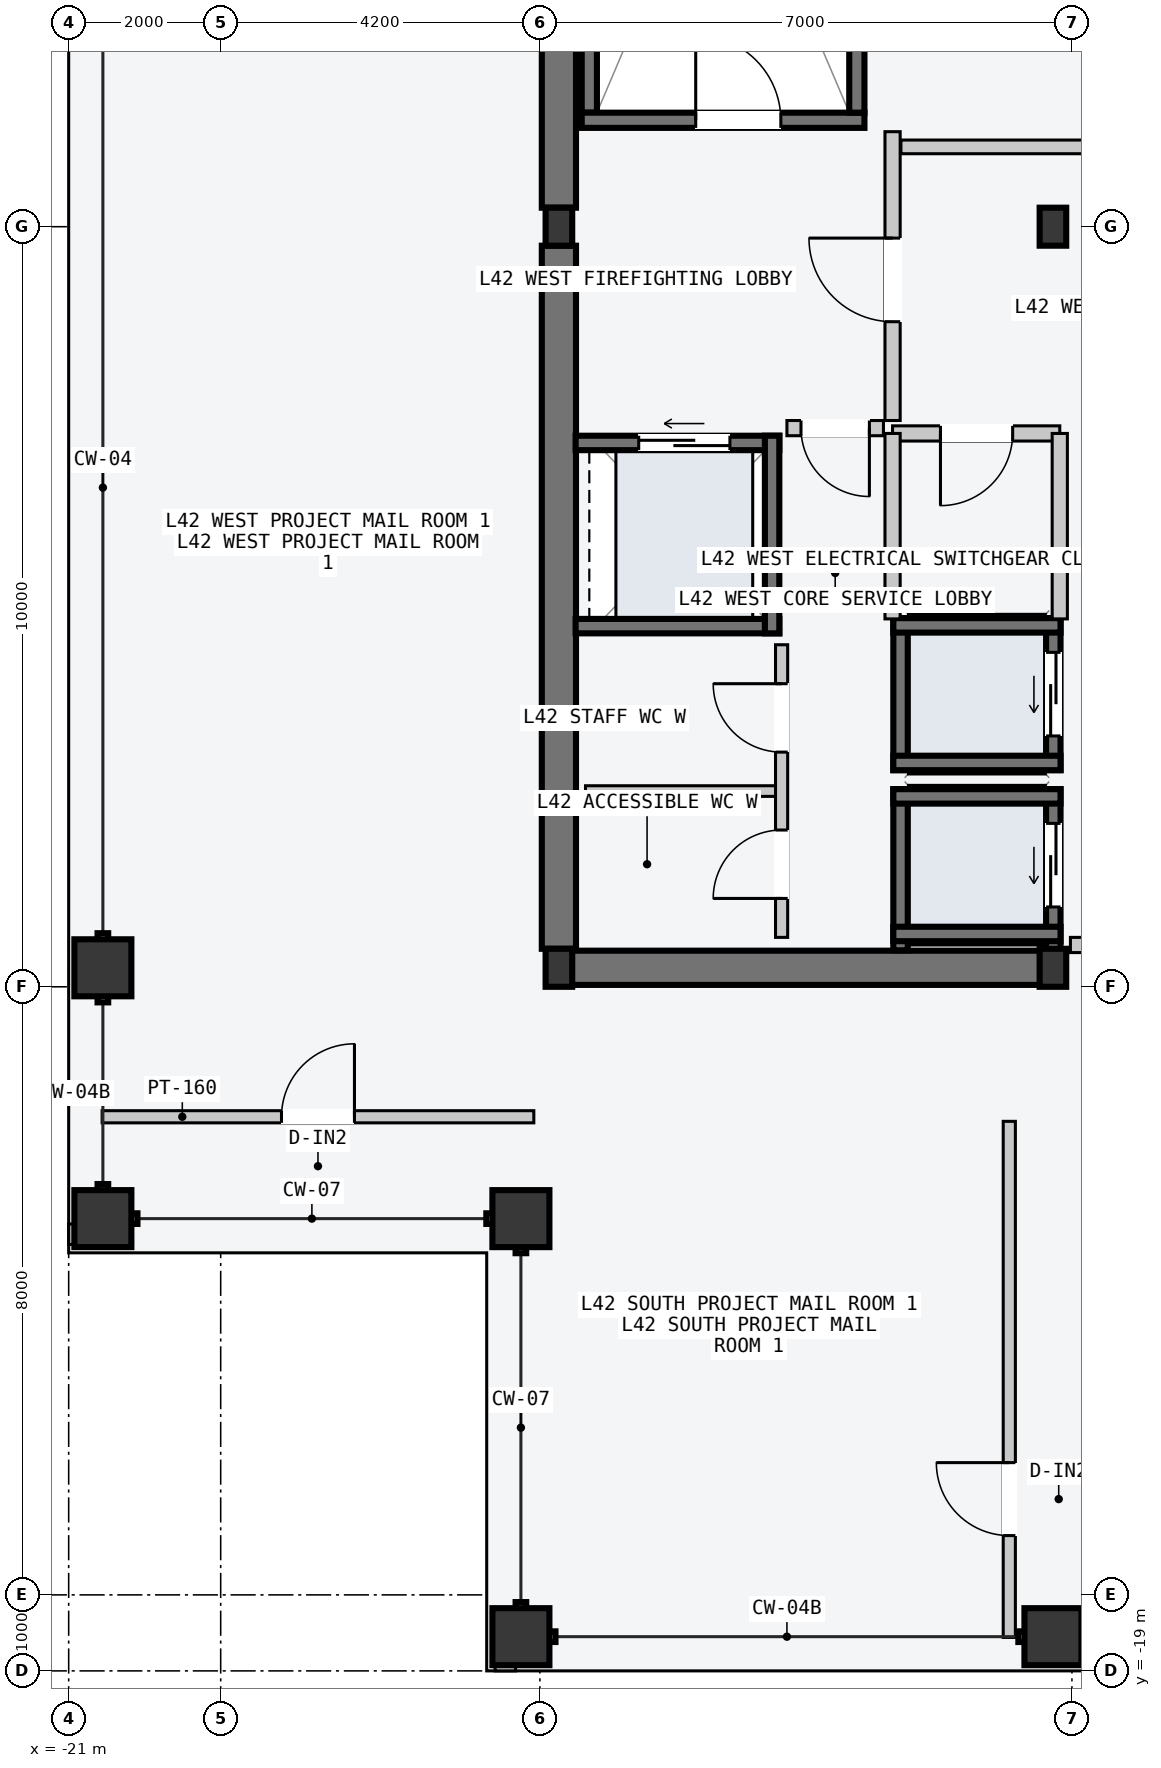
"""IFC4 building model, lengths in metres.
Left out: names, types, materials, properties, quantities, classifications, styles, units other than length and angle.
Written with IfcOpenShell. Run it as: python <this file> out.ifc"""

import sys

from ifc_helpers import new_model, si_unit, direction, frame, frame_2d, origin, origin_2d, place, context, subcontext, project, spatial, rectangle, hollow_rectangle, i_section, extrude, element, fill, save


model = new_model("IFC4")
c1 = context("Model", 3, precision=1e-05, world=origin(), true_north=direction((0.0, 1.0)))
c2 = subcontext(c1, "Body", "Model", "MODEL_VIEW")
j1 = project(units=[si_unit("LENGTHUNIT", "METRE"), si_unit("PLANEANGLEUNIT", "RADIAN")], contexts=[c1])
p1 = place(None, origin())
s1 = spatial("IfcSite", under=j1, at=p1, CompositionType="ELEMENT")
p2 = place(p1, origin())
s2 = spatial("IfcBuilding", under=s1, at=p2, CompositionType="ELEMENT")
p3 = place(p2, frame((0.0, 0.0, 162.3)))
s3 = spatial("IfcBuildingStorey", under=s2, at=p3, CompositionType="ELEMENT", Elevation=162.3)
p4 = place(p3, frame((-14.53, -9.75, -0.2), z_axis=(0.0, 0.0, 1.0), x_axis=(1.0, 0.0, 0.0)))
e1 = element("IfcWall", 1, at=p4, inside=s3, PredefinedType="SHEAR", context=c2, shape_type="SweptSolid", body=[
    extrude(rectangle(XDim=6.46, YDim=0.45, at=frame_2d((3.23, 0.0))), origin(), (0.0, 0.0, 1.0), 3.6),
])
for number, where, z_axis, x_axis in (
    (2, (-14.55, -9.5, -0.2), (0.0, 0.0, 1.0), (0.0, 1.0, 0.0)),
    (3, (-14.55, 0.25, -0.2), (0.0, 0.0, 1.0), (0.0, 1.0, 0.0)),
):
    element("IfcWall", number, at=place(p3, frame(where, z_axis=z_axis, x_axis=x_axis)), inside=s3, PredefinedType="SHEAR", context=c2, shape_type="SweptSolid", body=[
        extrude(rectangle(XDim=9.25, YDim=0.45, at=frame_2d((4.625, 0.0))), origin(), (0.0, 0.0, 1.0), 3.6),
    ])
p5 = place(p3, frame((-14.15, 1.5, -0.2), z_axis=(0.0, 0.0, 1.0), x_axis=(0.0, 1.0, 0.0)))
e4 = element("IfcWall", 4, at=p5, inside=s3, PredefinedType="SOLIDWALL", context=c2, shape_type="SweptSolid", body=[
    extrude(rectangle(XDim=7.8, YDim=0.2, at=frame_2d((3.9, 0.0))), origin(), (0.0, 0.0, 1.0), 3.6),
])
p6 = place(p3, frame((-14.25, 1.4, -0.2), z_axis=(0.0, 0.0, 1.0), x_axis=(1.0, 0.0, 0.0)))
e5 = element("IfcWall", 5, at=p6, inside=s3, PredefinedType="SOLIDWALL", context=c2, shape_type="SweptSolid", body=[
    extrude(rectangle(XDim=3.72, YDim=0.2, at=frame_2d((1.86, 0.0))), origin(), (0.0, 0.0, 1.0), 3.6),
])
p7 = place(p6, frame((1.5, 0.0, 0.2)))
e6 = element("IfcOpeningElement", 6, at=p7, cuts=e5, PredefinedType="OPENING", context=c2, shape_type="SweptSolid", body=[
    extrude(rectangle(XDim=1.12, YDim=2.18, at=frame_2d((0.56, 1.09))), frame((0.0, 0.11, 0.0), z_axis=(0.0, -1.0, 0.0), x_axis=(1.0, 0.0, 0.0)), (0.0, 0.0, 1.0), 0.22),
])
p8 = place(p3, frame((-10.63, 1.5, -0.2), z_axis=(0.0, 0.0, 1.0), x_axis=(0.0, 1.0, 0.0)))
e7 = element("IfcWall", 7, at=p8, inside=s3, PredefinedType="SOLIDWALL", context=c2, shape_type="SweptSolid", body=[
    extrude(rectangle(XDim=7.8, YDim=0.2, at=frame_2d((3.9, 0.0))), origin(), (0.0, 0.0, 1.0), 3.6),
])
for number, where, z_axis, x_axis in (
    (8, (-14.55, -9.75, 0.0), (0.0, 0.0, 1.0), (1.0, 0.0, 0.0)),
    (9, (-14.55, 0.0, 0.0), (0.0, 0.0, 1.0), (1.0, 0.0, 0.0)),
    (10, (-8.05, -9.75, 0.0), (0.0, 0.0, 1.0), (1.0, 0.0, 0.0)),
    (11, (-8.05, 0.0, 0.0), (0.0, 0.0, 1.0), (1.0, 0.0, 0.0)),
):
    element("IfcColumn", number, at=place(p3, frame(where, z_axis=z_axis, x_axis=x_axis)), inside=s3, PredefinedType="COLUMN", context=c2, shape_type="SweptSolid", body=[
        extrude(i_section(OverallWidth=0.35, OverallDepth=0.5, WebThickness=0.02, FlangeThickness=0.032, at=origin_2d()), origin(), (0.0, 0.0, 1.0), 3.6),
    ])
for number, where, z_axis, x_axis in (
    (12, (-15.05, -18.55, 0.0), (0.0, 0.0, 1.0), (1.0, 0.0, 0.0)),
    (13, (-8.05, -18.55, 0.0), (0.0, 0.0, 1.0), (1.0, 0.0, 0.0)),
    (14, (-20.55, -13.05, 0.0), (0.0, 0.0, 1.0), (0.0, 1.0, 0.0)),
    (15, (-20.55, -9.75, 0.0), (0.0, 0.0, 1.0), (0.0, 1.0, 0.0)),
    (16, (-15.05, -13.05, 0.0), (0.0, 0.0, 1.0), (1.0, 0.0, 0.0)),
):
    element("IfcColumn", number, at=place(p3, frame(where, z_axis=z_axis, x_axis=x_axis)), inside=s3, PredefinedType="COLUMN", context=c2, shape_type="SweptSolid", body=[
        extrude(hollow_rectangle(XDim=0.75, YDim=0.75, WallThickness=0.032, at=origin_2d()), origin(), (0.0, 0.0, 1.0), 3.6),
    ])
for number, where, z_axis, x_axis in (
    (17, (-15.39, -18.89, 0.0), (0.0, 0.0, 1.0), (1.0, 0.0, 0.0)),
    (18, (-20.89, -13.39, 0.0), (0.0, 0.0, 1.0), (0.0, 1.0, 0.0)),
):
    element("IfcWall", number, at=place(p3, frame(where, z_axis=z_axis, x_axis=x_axis)), inside=s3, PredefinedType="PARAPET", context=c2, shape_type="SweptSolid", body=[
        extrude(rectangle(XDim=0.27, YDim=0.22, at=frame_2d((0.135, 0.0))), origin(), (0.0, 0.0, 1.0), 1.2),
    ])
p9 = place(p3, frame((-8.045, -9.52, -0.2), z_axis=(0.0, 0.0, 1.0), x_axis=(0.0, 1.0, 0.0)))
e19 = element("IfcWall", 19, at=p9, inside=s3, PredefinedType="SOLIDWALL", context=c2, shape_type="SweptSolid", body=[
    extrude(rectangle(XDim=2.12, YDim=0.19, at=frame_2d((1.06, 0.0))), origin(), (0.0, 0.0, 1.0), 3.6),
])
p10 = place(p9, frame((0.57, 0.0, 0.2)))
e20 = element("IfcOpeningElement", 20, at=p10, cuts=e19, PredefinedType="OPENING", context=c2, shape_type="SweptSolid", body=[
    extrude(rectangle(XDim=1.1, YDim=2.2, at=frame_2d((0.55, 1.1))), frame((0.0, 0.105, 0.0), z_axis=(0.0, -1.0, 0.0), x_axis=(1.0, 0.0, 0.0)), (0.0, 0.0, 1.0), 0.21),
])
p11 = place(p3, frame((-10.055, -9.52, -0.2), z_axis=(0.0, 0.0, 1.0), x_axis=(0.0, 1.0, 0.0)))
e21 = element("IfcWall", 21, at=p11, inside=s3, PredefinedType="SOLIDWALL", context=c2, shape_type="SweptSolid", body=[
    extrude(rectangle(XDim=2.12, YDim=0.19, at=frame_2d((1.06, 0.0))), origin(), (0.0, 0.0, 1.0), 3.6),
])
for number, where, z_axis, x_axis in (
    (22, (-10.15, -7.495, -0.2), (0.0, 0.0, 1.0), (1.0, 0.0, 0.0)),
    (23, (-10.15, -9.305, -0.2), (0.0, 0.0, 1.0), (1.0, 0.0, 0.0)),
):
    element("IfcWall", number, at=place(p3, frame(where, z_axis=z_axis, x_axis=x_axis)), inside=s3, PredefinedType="SOLIDWALL", context=c2, shape_type="SweptSolid", body=[
        extrude(rectangle(XDim=2.2, YDim=0.19, at=frame_2d((1.1, 0.0))), origin(), (0.0, 0.0, 1.0), 3.6),
    ])
p12 = place(p3, frame((-8.045, -7.15, -0.2), z_axis=(0.0, 0.0, 1.0), x_axis=(0.0, 1.0, 0.0)))
e24 = element("IfcWall", 24, at=p12, inside=s3, PredefinedType="SOLIDWALL", context=c2, shape_type="SweptSolid", body=[
    extrude(rectangle(XDim=2.0, YDim=0.19, at=frame_2d((1.0, 0.0))), origin(), (0.0, 0.0, 1.0), 3.6),
])
p13 = place(p12, frame((0.45, 0.0, 0.2)))
e25 = element("IfcOpeningElement", 25, at=p13, cuts=e24, PredefinedType="OPENING", context=c2, shape_type="SweptSolid", body=[
    extrude(rectangle(XDim=1.1, YDim=2.2, at=frame_2d((0.55, 1.1))), frame((0.0, 0.105, 0.0), z_axis=(0.0, -1.0, 0.0), x_axis=(1.0, 0.0, 0.0)), (0.0, 0.0, 1.0), 0.21),
])
p14 = place(p3, frame((-10.055, -7.15, -0.2), z_axis=(0.0, 0.0, 1.0), x_axis=(0.0, 1.0, 0.0)))
e26 = element("IfcWall", 26, at=p14, inside=s3, PredefinedType="SOLIDWALL", context=c2, shape_type="SweptSolid", body=[
    extrude(rectangle(XDim=2.0, YDim=0.19, at=frame_2d((1.0, 0.0))), origin(), (0.0, 0.0, 1.0), 3.6),
])
for number, where, z_axis, x_axis in (
    (27, (-10.15, -5.245, -0.2), (0.0, 0.0, 1.0), (1.0, 0.0, 0.0)),
    (28, (-10.15, -7.055, -0.2), (0.0, 0.0, 1.0), (1.0, 0.0, 0.0)),
):
    element("IfcWall", number, at=place(p3, frame(where, z_axis=z_axis, x_axis=x_axis)), inside=s3, PredefinedType="SOLIDWALL", context=c2, shape_type="SweptSolid", body=[
        extrude(rectangle(XDim=2.2, YDim=0.19, at=frame_2d((1.1, 0.0))), origin(), (0.0, 0.0, 1.0), 3.6),
    ])
p15 = place(p3, frame((-14.33, -2.845, -0.2), z_axis=(0.0, 0.0, 1.0), x_axis=(1.0, 0.0, 0.0)))
e29 = element("IfcWall", 29, at=p15, inside=s3, PredefinedType="SOLIDWALL", context=c2, shape_type="SweptSolid", body=[
    extrude(rectangle(XDim=2.68, YDim=0.19, at=frame_2d((1.34, 0.0))), origin(), (0.0, 0.0, 1.0), 3.6),
])
p16 = place(p15, frame((0.83, 0.0, 0.2)))
e30 = element("IfcOpeningElement", 30, at=p16, cuts=e29, PredefinedType="OPENING", context=c2, shape_type="SweptSolid", body=[
    extrude(rectangle(XDim=1.2, YDim=2.2, at=frame_2d((0.6, 1.1))), frame((0.0, 0.105, 0.0), z_axis=(0.0, -1.0, 0.0), x_axis=(1.0, 0.0, 0.0)), (0.0, 0.0, 1.0), 0.21),
])
p17 = place(p3, frame((-14.33, -5.255, -0.2), z_axis=(0.0, 0.0, 1.0), x_axis=(1.0, 0.0, 0.0)))
e31 = element("IfcWall", 31, at=p17, inside=s3, PredefinedType="SOLIDWALL", context=c2, shape_type="SweptSolid", body=[
    extrude(rectangle(XDim=2.68, YDim=0.19, at=frame_2d((1.34, 0.0))), origin(), (0.0, 0.0, 1.0), 3.6),
])
p18 = place(p3, frame((-11.745, -5.35, -0.2), z_axis=(0.0, 0.0, 1.0), x_axis=(0.0, 1.0, 0.0)))
e32 = element("IfcWall", 32, at=p18, inside=s3, PredefinedType="SOLIDWALL", context=c2, shape_type="SweptSolid", body=[
    extrude(rectangle(XDim=2.6, YDim=0.19, at=frame_2d((1.3, 0.0))), origin(), (0.0, 0.0, 1.0), 3.6),
])
p19 = place(p3, frame((-6.02, -9.45, 0.0), z_axis=(0.0, 0.0, 1.0), x_axis=(-1.0, 0.0, 0.0)))
e33 = element("IfcWall", 33, at=p19, inside=s3, PredefinedType="PARTITIONING", context=c2, shape_type="SweptSolid", body=[
    extrude(rectangle(XDim=1.8, YDim=0.2, at=frame_2d((0.9, 0.0))), origin(), (0.0, 0.0, 1.0), 3.4),
])
p20 = place(p3, frame((-10.16, -2.55, 0.0), z_axis=(0.0, 0.0, 1.0), x_axis=(0.0, 1.0, 0.0)))
e34 = element("IfcWall", 34, at=p20, inside=s3, PredefinedType="PARTITIONING", context=c2, shape_type="SweptSolid", body=[
    extrude(rectangle(XDim=3.8, YDim=0.2, at=frame_2d((1.9, 0.0))), origin(), (0.0, 0.0, 1.0), 3.4),
])
p21 = place(p20, frame((1.3, 0.0, 0.0)))
e35 = element("IfcOpeningElement", 35, at=p21, cuts=e34, PredefinedType="OPENING", context=c2, shape_type="SweptSolid", body=[
    extrude(rectangle(XDim=1.1, YDim=2.15, at=frame_2d((0.55, 1.075))), frame((0.0, 0.11, 0.0), z_axis=(0.0, -1.0, 0.0), x_axis=(1.0, 0.0, 0.0)), (0.0, 0.0, 1.0), 0.22),
])
p22 = place(p3, frame((-10.28, -2.65, 0.0), z_axis=(0.0, 0.0, 1.0), x_axis=(-1.0, 0.0, 0.0)))
e36 = element("IfcWall", 36, at=p22, inside=s3, PredefinedType="PARTITIONING", context=c2, shape_type="SweptSolid", body=[
    extrude(rectangle(XDim=1.27, YDim=0.2, at=frame_2d((0.635, 0.0))), origin(), (0.0, 0.0, 1.0), 3.4),
])
p23 = place(p22, frame((0.185, 0.0, 0.0)))
e37 = element("IfcOpeningElement", 37, at=p23, cuts=e36, PredefinedType="OPENING", context=c2, shape_type="SweptSolid", body=[
    extrude(rectangle(XDim=0.9, YDim=2.15, at=frame_2d((0.45, 1.075))), frame((0.0, 0.11, 0.0), z_axis=(0.0, -1.0, 0.0), x_axis=(1.0, 0.0, 0.0)), (0.0, 0.0, 1.0), 0.22),
])
p24 = place(p3, frame((-7.96, -2.72, 0.0), z_axis=(0.0, 0.0, 1.0), x_axis=(-1.0, 0.0, 0.0)))
e38 = element("IfcWall", 38, at=p24, inside=s3, PredefinedType="PARTITIONING", context=c2, shape_type="SweptSolid", body=[
    extrude(rectangle(XDim=2.2, YDim=0.2, at=frame_2d((1.1, 0.0))), origin(), (0.0, 0.0, 1.0), 3.4),
])
p25 = place(p24, frame((0.62, 0.0, 0.0)))
e39 = element("IfcOpeningElement", 39, at=p25, cuts=e38, PredefinedType="OPENING", context=c2, shape_type="SweptSolid", body=[
    extrude(rectangle(XDim=0.95, YDim=2.1, at=frame_2d((0.475, 1.05))), frame((0.0, 0.11, 0.0), z_axis=(0.0, -1.0, 0.0), x_axis=(1.0, 0.0, 0.0)), (0.0, 0.0, 1.0), 0.22),
])
for number, where, z_axis, x_axis in (
    (40, (-7.96, -5.16, 0.0), (0.0, 0.0, 1.0), (0.0, 1.0, 0.0)),
    (41, (-10.16, -5.16, 0.0), (0.0, 0.0, 1.0), (0.0, 1.0, 0.0)),
):
    element("IfcWall", number, at=place(p3, frame(where, z_axis=z_axis, x_axis=x_axis)), inside=s3, PredefinedType="PARTITIONING", context=c2, shape_type="SweptSolid", body=[
        extrude(rectangle(XDim=2.44, YDim=0.2, at=frame_2d((1.22, 0.0))), origin(), (0.0, 0.0, 1.0), 3.4),
    ])
p26 = place(p3, frame((-11.7, -7.425, 0.0), z_axis=(0.0, 0.0, 1.0), x_axis=(-1.0, 0.0, 0.0)))
e42 = element("IfcWall", 42, at=p26, inside=s3, PredefinedType="PARTITIONING", context=c2, shape_type="SweptSolid", body=[
    extrude(rectangle(XDim=2.5, YDim=0.14, at=frame_2d((1.25, 0.0))), origin(), (0.0, 0.0, 1.0), 3.4),
])
p27 = place(p3, frame((-11.62, -9.35, 0.0), z_axis=(0.0, 0.0, 1.0), x_axis=(0.0, 1.0, 0.0)))
e43 = element("IfcWall", 43, at=p27, inside=s3, PredefinedType="PARTITIONING", context=c2, shape_type="SweptSolid", body=[
    extrude(rectangle(XDim=3.85, YDim=0.16, at=frame_2d((1.925, 0.0))), origin(), (0.0, 0.0, 1.0), 3.4),
])
p28 = place(p27, frame((0.512, 0.0, 0.0)))
e44 = element("IfcOpeningElement", 44, at=p28, cuts=e43, PredefinedType="OPENING", context=c2, shape_type="SweptSolid", body=[
    extrude(rectangle(XDim=0.9, YDim=2.15, at=frame_2d((0.45, 1.075))), frame((0.0, 0.09, 0.0), z_axis=(0.0, -1.0, 0.0), x_axis=(1.0, 0.0, 0.0)), (0.0, 0.0, 1.0), 0.18),
])
p29 = place(p27, frame((2.438, 0.0, 0.0)))
e45 = element("IfcOpeningElement", 45, at=p29, cuts=e43, PredefinedType="OPENING", context=c2, shape_type="SweptSolid", body=[
    extrude(rectangle(XDim=0.9, YDim=2.15, at=frame_2d((0.45, 1.075))), frame((0.0, 0.09, 0.0), z_axis=(0.0, -1.0, 0.0), x_axis=(1.0, 0.0, 0.0)), (0.0, 0.0, 1.0), 0.18),
])
p30 = place(p3, frame((-10.05, 1.05, 0.0), z_axis=(0.0, 0.0, 1.0), x_axis=(1.0, 0.0, 0.0)))
e46 = element("IfcWall", 46, at=p30, inside=s3, PredefinedType="PARTITIONING", context=c2, shape_type="SweptSolid", body=[
    extrude(rectangle(XDim=8.79, YDim=0.18, at=frame_2d((4.395, 0.0))), origin(), (0.0, 0.0, 1.0), 3.4),
])
p31 = place(p3, frame((-8.624, -18.56, 0.0), z_axis=(0.0, 0.0, 1.0), x_axis=(0.0, 1.0, 0.0)))
e47 = element("IfcWall", 47, at=p31, inside=s3, PredefinedType="PARTITIONING", context=c2, shape_type="SweptSolid", body=[
    extrude(rectangle(XDim=6.79, YDim=0.16, at=frame_2d((3.395, 0.0))), origin(), (0.0, 0.0, 1.0), 3.4),
])
p32 = place(p31, frame((1.34, 0.0, 0.0)))
e48 = element("IfcOpeningElement", 48, at=p32, cuts=e47, PredefinedType="OPENING", context=c2, shape_type="SweptSolid", body=[
    extrude(rectangle(XDim=0.96, YDim=2.18, at=frame_2d((0.48, 1.09))), frame((0.0, 0.09, 0.0), z_axis=(0.0, -1.0, 0.0), x_axis=(1.0, 0.0, 0.0)), (0.0, 0.0, 1.0), 0.18),
])
p33 = place(p3, frame((-20.56, -11.71, 0.0), z_axis=(0.0, 0.0, 1.0), x_axis=(1.0, 0.0, 0.0)))
e49 = element("IfcWall", 49, at=p33, inside=s3, PredefinedType="PARTITIONING", context=c2, shape_type="SweptSolid", body=[
    extrude(rectangle(XDim=5.68, YDim=0.16, at=frame_2d((2.84, 0.0))), origin(), (0.0, 0.0, 1.0), 3.4),
])
p34 = place(p33, frame((2.36, 0.0, 0.0)))
e50 = element("IfcOpeningElement", 50, at=p34, cuts=e49, PredefinedType="OPENING", context=c2, shape_type="SweptSolid", body=[
    extrude(rectangle(XDim=0.96, YDim=2.18, at=frame_2d((0.48, 1.09))), frame((0.0, 0.09, 0.0), z_axis=(0.0, -1.0, 0.0), x_axis=(1.0, 0.0, 0.0)), (0.0, 0.0, 1.0), 0.18),
])
p35 = place(p7, origin())
e51 = element("IfcDoor", 51, at=p35, inside=s3, OperationType="SINGLE_SWING_LEFT", PredefinedType="DOOR", context=c2, shape_type="SweptSolid", body=[
    extrude(rectangle(XDim=1.12, YDim=2.18, at=frame_2d((0.56, 1.09))), frame((0.0, 0.025, 0.0), z_axis=(0.0, -1.0, 0.0), x_axis=(1.0, 0.0, 0.0)), (0.0, 0.0, 1.0), 0.05),
])
fill(e6, e51)
p36 = place(p10, origin())
e52 = element("IfcDoor", 52, at=p36, inside=s3, OperationType="SLIDING_TO_LEFT", PredefinedType="DOOR", context=c2, shape_type="SweptSolid", body=[
    extrude(rectangle(XDim=1.1, YDim=2.2, at=frame_2d((0.55, 1.1))), frame((0.0, 0.025, 0.0), z_axis=(0.0, -1.0, 0.0), x_axis=(1.0, 0.0, 0.0)), (0.0, 0.0, 1.0), 0.05),
])
fill(e20, e52)
p37 = place(p13, origin())
e53 = element("IfcDoor", 53, at=p37, inside=s3, OperationType="SLIDING_TO_LEFT", PredefinedType="DOOR", context=c2, shape_type="SweptSolid", body=[
    extrude(rectangle(XDim=1.1, YDim=2.2, at=frame_2d((0.55, 1.1))), frame((0.0, 0.025, 0.0), z_axis=(0.0, -1.0, 0.0), x_axis=(1.0, 0.0, 0.0)), (0.0, 0.0, 1.0), 0.05),
])
fill(e25, e53)
p38 = place(p16, origin())
e54 = element("IfcDoor", 54, at=p38, inside=s3, OperationType="SLIDING_TO_LEFT", PredefinedType="DOOR", context=c2, shape_type="SweptSolid", body=[
    extrude(rectangle(XDim=1.2, YDim=2.2, at=frame_2d((0.6, 1.1))), frame((0.0, 0.025, 0.0), z_axis=(0.0, -1.0, 0.0), x_axis=(1.0, 0.0, 0.0)), (0.0, 0.0, 1.0), 0.05),
])
fill(e30, e54)
p39 = place(p21, origin())
e55 = element("IfcDoor", 55, at=p39, inside=s3, OperationType="SINGLE_SWING_RIGHT", PredefinedType="DOOR", context=c2, shape_type="SweptSolid", body=[
    extrude(rectangle(XDim=1.1, YDim=2.15, at=frame_2d((0.55, 1.075))), frame((0.0, 0.025, 0.0), z_axis=(0.0, -1.0, 0.0), x_axis=(1.0, 0.0, 0.0)), (0.0, 0.0, 1.0), 0.05),
])
fill(e35, e55)
p40 = place(p23, origin())
e56 = element("IfcDoor", 56, at=p40, inside=s3, OperationType="SINGLE_SWING_LEFT", PredefinedType="DOOR", context=c2, shape_type="SweptSolid", body=[
    extrude(rectangle(XDim=0.9, YDim=2.15, at=frame_2d((0.45, 1.075))), frame((0.0, 0.025, 0.0), z_axis=(0.0, -1.0, 0.0), x_axis=(1.0, 0.0, 0.0)), (0.0, 0.0, 1.0), 0.05),
])
fill(e37, e56)
p41 = place(p25, origin())
e57 = element("IfcDoor", 57, at=p41, inside=s3, OperationType="SINGLE_SWING_RIGHT", PredefinedType="DOOR", context=c2, shape_type="SweptSolid", body=[
    extrude(rectangle(XDim=0.95, YDim=2.1, at=frame_2d((0.475, 1.05))), frame((0.0, 0.025, 0.0), z_axis=(0.0, -1.0, 0.0), x_axis=(1.0, 0.0, 0.0)), (0.0, 0.0, 1.0), 0.05),
])
fill(e39, e57)
p42 = place(p28, origin())
e58 = element("IfcDoor", 58, at=p42, inside=s3, OperationType="SINGLE_SWING_LEFT", PredefinedType="DOOR", context=c2, shape_type="SweptSolid", body=[
    extrude(rectangle(XDim=0.9, YDim=2.15, at=frame_2d((0.45, 1.075))), frame((0.0, 0.025, 0.0), z_axis=(0.0, -1.0, 0.0), x_axis=(1.0, 0.0, 0.0)), (0.0, 0.0, 1.0), 0.05),
])
fill(e44, e58)
p43 = place(p29, origin())
e59 = element("IfcDoor", 59, at=p43, inside=s3, OperationType="SINGLE_SWING_RIGHT", PredefinedType="DOOR", context=c2, shape_type="SweptSolid", body=[
    extrude(rectangle(XDim=0.9, YDim=2.15, at=frame_2d((0.45, 1.075))), frame((0.0, 0.025, 0.0), z_axis=(0.0, -1.0, 0.0), x_axis=(1.0, 0.0, 0.0)), (0.0, 0.0, 1.0), 0.05),
])
fill(e45, e59)
p44 = place(p32, origin())
e60 = element("IfcDoor", 60, at=p44, inside=s3, OperationType="SINGLE_SWING_RIGHT", PredefinedType="DOOR", context=c2, shape_type="SweptSolid", body=[
    extrude(rectangle(XDim=0.96, YDim=2.18, at=frame_2d((0.48, 1.09))), frame((0.0, 0.025, 0.0), z_axis=(0.0, -1.0, 0.0), x_axis=(1.0, 0.0, 0.0)), (0.0, 0.0, 1.0), 0.05),
])
fill(e48, e60)
p45 = place(p34, origin())
e61 = element("IfcDoor", 61, at=p45, inside=s3, OperationType="SINGLE_SWING_RIGHT", PredefinedType="DOOR", context=c2, shape_type="SweptSolid", body=[
    extrude(rectangle(XDim=0.96, YDim=2.18, at=frame_2d((0.48, 1.09))), frame((0.0, 0.025, 0.0), z_axis=(0.0, -1.0, 0.0), x_axis=(1.0, 0.0, 0.0)), (0.0, 0.0, 1.0), 0.05),
])
fill(e50, e61)
save(model, sys.argv[1])
